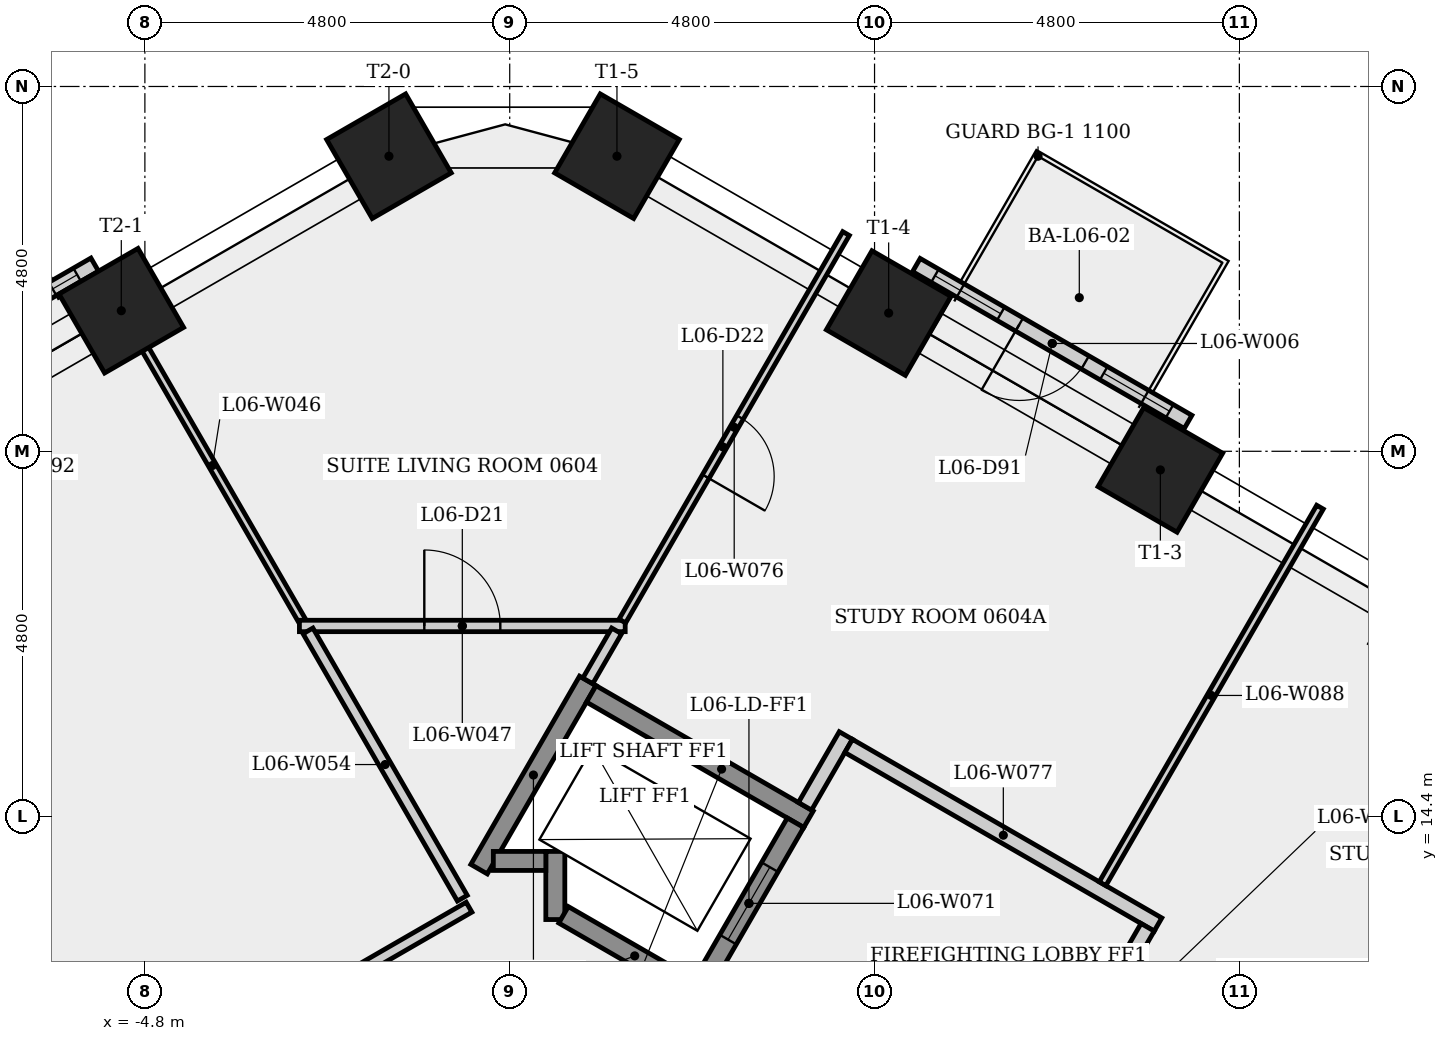
"""IFC4 building model, lengths in metres.
Left out: names, types, materials, properties, quantities, classifications, styles, units other than length and angle.
Written with IfcOpenShell. Run it as: python <this file> out.ifc"""

import sys

from ifc_helpers import new_model, si_unit, direction, frame, frame_2d, origin, origin_2d, place, context, subcontext, project, spatial, rectangle, extrude, element, fill, save


model = new_model("IFC4")
c1 = context("Model", 3, precision=1e-05, world=origin(), true_north=direction((0.0, 1.0)))
c2 = subcontext(c1, "Body", "Model", "MODEL_VIEW")
j1 = project(units=[si_unit("LENGTHUNIT", "METRE"), si_unit("PLANEANGLEUNIT", "RADIAN")], contexts=[c1])
p1 = place(None, origin())
s1 = spatial("IfcSite", under=j1, at=p1, CompositionType="ELEMENT")
p2 = place(p1, origin())
s2 = spatial("IfcBuilding", under=s1, at=p2, CompositionType="ELEMENT")
p3 = place(p2, frame((0.0, 0.0, 28.9)))
s3 = spatial("IfcBuildingStorey", under=s2, at=p3, CompositionType="ELEMENT", Elevation=28.9)
for number, where, z_axis, x_axis in (
    (1, (8.561, 18.955, 0.0), (0.0, 0.0, 1.0), (0.5, 0.866, 0.0)),
    (2, (4.986, 21.019, 0.0), (0.0, 0.0, 1.0), (0.5, 0.866, 0.0)),
    (3, (1.411, 23.083, 0.0), (0.0, 0.0, 1.0), (0.5, 0.866, 0.0)),
    (4, (-1.589, 23.083, 0.0), (0.0, 0.0, 1.0), (-0.5, 0.866, 0.0)),
    (5, (-5.11, 21.05, 0.0), (0.0, 0.0, 1.0), (-0.5, 0.866, 0.0)),
):
    element("IfcColumn", number, at=place(p3, frame(where, z_axis=z_axis, x_axis=x_axis)), inside=s3, PredefinedType="COLUMN", context=c2, shape_type="SweptSolid", body=[
        extrude(rectangle(XDim=1.2, YDim=1.2, at=origin_2d()), origin(), (0.0, 0.0, 1.0), 3.4),
    ])
p4 = place(p3, frame((-5.46, 21.656, 0.0), z_axis=(0.0, 0.0, 1.0), x_axis=(-0.866021634107, -0.500006529216, 0.0)))
e6 = element("IfcWall", 6, at=p4, inside=s3, PredefinedType="SOLIDWALL", context=c2, shape_type="SweptSolid", body=[
    extrude(rectangle(XDim=4.067, YDim=0.2, at=frame_2d((2.033, 0.0))), origin(), (0.0, 0.0, 1.0), 3.4),
])
p5 = place(p4, frame((1.533, 0.0, 0.0)))
e7 = element("IfcOpeningElement", 7, at=p5, cuts=e6, PredefinedType="OPENING", context=c2, shape_type="SweptSolid", body=[
    extrude(rectangle(XDim=1.0, YDim=2.4, at=frame_2d((0.5, 1.2))), frame((0.0, 0.11, 0.0), z_axis=(0.0, -1.0, 0.0), x_axis=(1.0, 0.0, 0.0)), (0.0, 0.0, 1.0), 0.22),
])
p6 = place(p4, frame((0.267, 0.0, 0.9)))
e8 = element("IfcOpeningElement", 8, at=p6, cuts=e6, PredefinedType="OPENING", context=c2, shape_type="SweptSolid", body=[
    extrude(rectangle(XDim=1.0, YDim=1.5, at=frame_2d((0.5, 0.75))), frame((0.0, 0.11, 0.0), z_axis=(0.0, -1.0, 0.0), x_axis=(1.0, 0.0, 0.0)), (0.0, 0.0, 1.0), 0.22),
])
p7 = place(p4, frame((2.8, 0.0, 0.9)))
e9 = element("IfcOpeningElement", 9, at=p7, cuts=e6, PredefinedType="OPENING", context=c2, shape_type="SweptSolid", body=[
    extrude(rectangle(XDim=1.0, YDim=1.5, at=frame_2d((0.5, 0.75))), frame((0.0, 0.11, 0.0), z_axis=(0.0, -1.0, 0.0), x_axis=(1.0, 0.0, 0.0)), (0.0, 0.0, 1.0), 0.22),
])
p8 = place(p3, frame((8.926, 19.587, 0.0), z_axis=(0.0, 0.0, 1.0), x_axis=(-0.866028988896, 0.499993790352, 0.0)))
e10 = element("IfcWall", 10, at=p8, inside=s3, PredefinedType="SOLIDWALL", context=c2, shape_type="SweptSolid", body=[
    extrude(rectangle(XDim=4.128, YDim=0.2, at=frame_2d((2.064, 0.0))), origin(), (0.0, 0.0, 1.0), 3.4),
])
p9 = place(p8, frame((1.564, 0.0, 0.0)))
e11 = element("IfcOpeningElement", 11, at=p9, cuts=e10, PredefinedType="OPENING", context=c2, shape_type="SweptSolid", body=[
    extrude(rectangle(XDim=1.0, YDim=2.4, at=frame_2d((0.5, 1.2))), frame((0.0, 0.11, 0.0), z_axis=(0.0, -1.0, 0.0), x_axis=(1.0, 0.0, 0.0)), (0.0, 0.0, 1.0), 0.22),
])
p10 = place(p8, frame((0.282, 0.0, 0.9)))
e12 = element("IfcOpeningElement", 12, at=p10, cuts=e10, PredefinedType="OPENING", context=c2, shape_type="SweptSolid", body=[
    extrude(rectangle(XDim=1.0, YDim=1.5, at=frame_2d((0.5, 0.75))), frame((0.0, 0.11, 0.0), z_axis=(0.0, -1.0, 0.0), x_axis=(1.0, 0.0, 0.0)), (0.0, 0.0, 1.0), 0.22),
])
p11 = place(p8, frame((2.846, 0.0, 0.9)))
e13 = element("IfcOpeningElement", 13, at=p11, cuts=e10, PredefinedType="OPENING", context=c2, shape_type="SweptSolid", body=[
    extrude(rectangle(XDim=1.0, YDim=1.5, at=frame_2d((0.5, 0.75))), frame((0.0, 0.11, 0.0), z_axis=(0.0, -1.0, 0.0), x_axis=(1.0, 0.0, 0.0)), (0.0, 0.0, 1.0), 0.22),
])
p12 = place(p3, frame((-10.825, 7.26, 0.0), z_axis=(0.0, 0.0, 1.0), x_axis=(0.866026819738, 0.499997547488, 0.0)))
e14 = element("IfcWall", 14, at=p12, inside=s3, PredefinedType="PARTITIONING", context=c2, shape_type="SweptSolid", body=[
    extrude(rectangle(XDim=11.882, YDim=0.15, at=frame_2d((5.941, 0.0))), origin(), (0.0, 0.0, 1.0), 3.05),
])
p13 = place(p12, frame((5.403, 0.0, 0.0)))
e15 = element("IfcOpeningElement", 15, at=p13, cuts=e14, PredefinedType="OPENING", context=c2, shape_type="SweptSolid", body=[
    extrude(rectangle(XDim=1.0, YDim=2.1, at=frame_2d((0.5, 1.05))), frame((0.0, 0.085, 0.0), z_axis=(0.0, -1.0, 0.0), x_axis=(1.0, 0.0, 0.0)), (0.0, 0.0, 1.0), 0.17),
])
p14 = place(p3, frame((-2.729, 16.967, 0.0), z_axis=(0.0, 0.0, 1.0), x_axis=(-0.500005632288, 0.866022151957, 0.0)))
e16 = element("IfcWall", 16, at=p14, inside=s3, PredefinedType="PARTITIONING", context=c2, shape_type="SweptSolid", body=[
    extrude(rectangle(XDim=4.727, YDim=0.1, at=frame_2d((2.363, 0.0))), origin(), (0.0, 0.0, 1.0), 3.05),
])
p15 = place(p3, frame((-2.767, 16.902, 0.0), z_axis=(0.0, 0.0, 1.0), x_axis=(1.0, 0.0, 0.0)))
e17 = element("IfcWall", 17, at=p15, inside=s3, PredefinedType="PARTITIONING", context=c2, shape_type="SweptSolid", body=[
    extrude(rectangle(XDim=4.286, YDim=0.15, at=frame_2d((2.143, 0.0))), origin(), (0.0, 0.0, 1.0), 3.05),
])
p16 = place(p15, frame((1.643, 0.0, 0.0)))
e18 = element("IfcOpeningElement", 18, at=p16, cuts=e17, PredefinedType="OPENING", context=c2, shape_type="SweptSolid", body=[
    extrude(rectangle(XDim=1.0, YDim=2.1, at=frame_2d((0.5, 1.05))), frame((0.0, 0.085, 0.0), z_axis=(0.0, -1.0, 0.0), x_axis=(1.0, 0.0, 0.0)), (0.0, 0.0, 1.0), 0.17),
])
p17 = place(p3, frame((-0.624, 13.32, 0.0), z_axis=(0.0, 0.0, 1.0), x_axis=(-0.499986114097, 0.866033420666, 0.0)))
e19 = element("IfcWall", 19, at=p17, inside=s3, PredefinedType="PARTITIONING", context=c2, shape_type="SweptSolid", body=[
    extrude(rectangle(XDim=4.061, YDim=0.15, at=frame_2d((2.031, 0.0))), origin(), (0.0, 0.0, 1.0), 3.05),
])
p18 = place(p3, frame((-0.403, 13.702, 0.0), z_axis=(0.0, 0.0, 1.0), x_axis=(0.499976111731, 0.866039195244, 0.0)))
e20 = element("IfcWall", 20, at=p18, inside=s3, PredefinedType="SHEAR", context=c2, shape_type="SweptSolid", body=[
    extrude(rectangle(XDim=2.861, YDim=0.25, at=frame_2d((1.43, 0.0))), origin(), (0.0, 0.0, 1.0), 3.05),
])
p19 = place(p3, frame((0.6, 13.039, 0.0), z_axis=(0.0, 0.0, 1.0), x_axis=(0.0, 1.0, 0.0)))
e21 = element("IfcWall", 21, at=p19, inside=s3, PredefinedType="SHEAR", context=c2, shape_type="SweptSolid", body=[
    extrude(rectangle(XDim=0.896, YDim=0.25, at=frame_2d((0.448, 0.0))), origin(), (0.0, 0.0, 1.0), 3.05),
])
p20 = place(p3, frame((0.475, 13.81, 0.0), z_axis=(0.0, 0.0, 1.0), x_axis=(-1.0, 0.0, 0.0)))
e22 = element("IfcWall", 22, at=p20, inside=s3, PredefinedType="SHEAR", context=c2, shape_type="SweptSolid", body=[
    extrude(rectangle(XDim=0.691, YDim=0.25, at=frame_2d((0.345, 0.0))), origin(), (0.0, 0.0, 1.0), 3.4),
])
p21 = place(p3, frame((1.073, 16.008, 0.0), z_axis=(0.0, 0.0, 1.0), x_axis=(0.866040211805, -0.499974350878, 0.0)))
e23 = element("IfcWall", 23, at=p21, inside=s3, PredefinedType="SHEAR", context=c2, shape_type="SweptSolid", body=[
    extrude(rectangle(XDim=3.3, YDim=0.25, at=frame_2d((1.65, 0.0))), origin(), (0.0, 0.0, 1.0), 3.05),
])
p22 = place(p3, frame((1.407, 16.837, 0.0), z_axis=(0.0, 0.0, 1.0), x_axis=(-0.499907982315, -0.866078523702, 0.0)))
e24 = element("IfcWall", 24, at=p22, inside=s3, PredefinedType="PARTITIONING", context=c2, shape_type="SweptSolid", body=[
    extrude(rectangle(XDim=0.76, YDim=0.15, at=frame_2d((0.38, 0.0))), origin(), (0.0, 0.0, 1.0), 3.05),
])
p23 = place(p3, frame((2.581, 12.02, 0.0), z_axis=(0.0, 0.0, 1.0), x_axis=(-0.86603892542, 0.499976579108, 0.0)))
e25 = element("IfcWall", 25, at=p23, inside=s3, PredefinedType="SHEAR", context=c2, shape_type="SweptSolid", body=[
    extrude(rectangle(XDim=2.162, YDim=0.25, at=frame_2d((1.081, 0.0))), origin(), (0.0, 0.0, 1.0), 3.05),
])
p24 = place(p3, frame((2.535, 12.191, 0.0), z_axis=(0.0, 0.0, 1.0), x_axis=(0.500061746146, 0.865989751695, 0.0)))
e26 = element("IfcWall", 26, at=p24, inside=s3, PredefinedType="SHEAR", context=c2, shape_type="SweptSolid", body=[
    extrude(rectangle(XDim=2.45, YDim=0.25, at=frame_2d((1.225, 0.0))), origin(), (0.0, 0.0, 1.0), 3.4),
])
p25 = place(p24, frame((0.675, 0.0, 0.0)))
e27 = element("IfcOpeningElement", 27, at=p25, cuts=e26, PredefinedType="OPENING", context=c2, shape_type="SweptSolid", body=[
    extrude(rectangle(XDim=1.1, YDim=2.1, at=frame_2d((0.55, 1.05))), frame((0.0, 0.135, 0.0), z_axis=(0.0, -1.0, 0.0), x_axis=(1.0, 0.0, 0.0)), (0.0, 0.0, 1.0), 0.27),
])
p26 = place(p3, frame((3.885, 14.529, 0.0), z_axis=(0.0, 0.0, 1.0), x_axis=(0.499997628298, 0.866026773083, 0.0)))
e28 = element("IfcWall", 28, at=p26, inside=s3, PredefinedType="PARTITIONING", context=c2, shape_type="SweptSolid", body=[
    extrude(rectangle(XDim=1.075, YDim=0.2, at=frame_2d((0.538, 0.0))), origin(), (0.0, 0.0, 1.0), 3.05),
])
p27 = place(p3, frame((4.425, 22.065, 0.0), z_axis=(0.0, 0.0, 1.0), x_axis=(-0.500024001918, -0.866011545827, 0.0)))
e29 = element("IfcWall", 29, at=p27, inside=s3, PredefinedType="PARTITIONING", context=c2, shape_type="SweptSolid", body=[
    extrude(rectangle(XDim=5.887, YDim=0.1, at=frame_2d((2.943, 0.0))), origin(), (0.0, 0.0, 1.0), 3.05),
])
p28 = place(p27, frame((2.792, 0.0, 0.0)))
e30 = element("IfcOpeningElement", 30, at=p28, cuts=e29, PredefinedType="OPENING", context=c2, shape_type="SweptSolid", body=[
    extrude(rectangle(XDim=0.9, YDim=2.1, at=frame_2d((0.45, 1.05))), frame((0.0, 0.06, 0.0), z_axis=(0.0, -1.0, 0.0), x_axis=(1.0, 0.0, 0.0)), (0.0, 0.0, 1.0), 0.12),
])
p29 = place(p3, frame((4.459, 15.323, 0.0), z_axis=(0.0, 0.0, 1.0), x_axis=(0.866016039709, -0.500016218704, 0.0)))
e31 = element("IfcWall", 31, at=p29, inside=s3, PredefinedType="PARTITIONING", context=c2, shape_type="SweptSolid", body=[
    extrude(rectangle(XDim=4.7, YDim=0.2, at=frame_2d((2.35, 0.0))), origin(), (0.0, 0.0, 1.0), 3.05),
])
p30 = place(p3, frame((6.48, 9.624, 0.0), z_axis=(0.0, 0.0, 1.0), x_axis=(0.500017246033, 0.866015446554, 0.0)))
e32 = element("IfcWall", 32, at=p30, inside=s3, PredefinedType="SHEAR", context=c2, shape_type="SweptSolid", body=[
    extrude(rectangle(XDim=3.25, YDim=0.25, at=frame_2d((1.625, 0.0))), origin(), (0.0, 0.0, 1.0), 3.05),
])
p31 = place(p30, frame((1.125, 0.0, 0.0)))
e33 = element("IfcOpeningElement", 33, at=p31, cuts=e32, PredefinedType="OPENING", context=c2, shape_type="SweptSolid", body=[
    extrude(rectangle(XDim=1.0, YDim=2.1, at=frame_2d((0.5, 1.05))), frame((0.0, 0.135, 0.0), z_axis=(0.0, -1.0, 0.0), x_axis=(1.0, 0.0, 0.0)), (0.0, 0.0, 1.0), 0.27),
])
p32 = place(p3, frame((7.8, 13.51, 0.0), z_axis=(0.0, 0.0, 1.0), x_axis=(0.499989639809, 0.866031385161, 0.0)))
e34 = element("IfcWall", 34, at=p32, inside=s3, PredefinedType="PARTITIONING", context=c2, shape_type="SweptSolid", body=[
    extrude(rectangle(XDim=5.721, YDim=0.1, at=frame_2d((2.861, 0.0))), origin(), (0.0, 0.0, 1.0), 3.05),
])
p33 = place(p3, frame((8.393, 12.937, 0.0), z_axis=(0.0, 0.0, 1.0), x_axis=(-0.500065409566, -0.86598763626, 0.0)))
e35 = element("IfcWall", 35, at=p33, inside=s3, PredefinedType="PARTITIONING", context=c2, shape_type="SweptSolid", body=[
    extrude(rectangle(XDim=0.575, YDim=0.2, at=frame_2d((0.288, 0.0))), origin(), (0.0, 0.0, 1.0), 3.05),
])
p34 = place(p6, origin())
e36 = element("IfcWindow", 36, at=p34, inside=s3, PartitioningType="SINGLE_PANEL", PredefinedType="WINDOW", context=c2, shape_type="SweptSolid", body=[
    extrude(rectangle(XDim=1.0, YDim=1.5, at=frame_2d((0.5, 0.75))), frame((0.0, 0.03, 0.0), z_axis=(0.0, -1.0, 0.0), x_axis=(1.0, 0.0, 0.0)), (0.0, 0.0, 1.0), 0.06),
])
fill(e8, e36)
p35 = place(p9, origin())
e37 = element("IfcDoor", 37, at=p35, inside=s3, OperationType="SINGLE_SWING_RIGHT", PredefinedType="DOOR", context=c2, shape_type="SweptSolid", body=[
    extrude(rectangle(XDim=1.0, YDim=2.4, at=frame_2d((0.5, 1.2))), frame((0.0, 0.025, 0.0), z_axis=(0.0, -1.0, 0.0), x_axis=(1.0, 0.0, 0.0)), (0.0, 0.0, 1.0), 0.05),
])
fill(e11, e37)
p36 = place(p10, origin())
e38 = element("IfcWindow", 38, at=p36, inside=s3, PartitioningType="SINGLE_PANEL", PredefinedType="WINDOW", context=c2, shape_type="SweptSolid", body=[
    extrude(rectangle(XDim=1.0, YDim=1.5, at=frame_2d((0.5, 0.75))), frame((0.0, 0.03, 0.0), z_axis=(0.0, -1.0, 0.0), x_axis=(1.0, 0.0, 0.0)), (0.0, 0.0, 1.0), 0.06),
])
fill(e12, e38)
p37 = place(p11, origin())
e39 = element("IfcWindow", 39, at=p37, inside=s3, PartitioningType="SINGLE_PANEL", PredefinedType="WINDOW", context=c2, shape_type="SweptSolid", body=[
    extrude(rectangle(XDim=1.0, YDim=1.5, at=frame_2d((0.5, 0.75))), frame((0.0, 0.03, 0.0), z_axis=(0.0, -1.0, 0.0), x_axis=(1.0, 0.0, 0.0)), (0.0, 0.0, 1.0), 0.06),
])
fill(e13, e39)
p38 = place(p25, origin())
e40 = element("IfcDoor", 40, at=p38, inside=s3, OperationType="SLIDING_TO_LEFT", PredefinedType="DOOR", context=c2, shape_type="SweptSolid", body=[
    extrude(rectangle(XDim=1.1, YDim=2.1, at=frame_2d((0.55, 1.05))), frame((0.0, 0.025, 0.0), z_axis=(0.0, -1.0, 0.0), x_axis=(1.0, 0.0, 0.0)), (0.0, 0.0, 1.0), 0.05),
])
fill(e27, e40)
p39 = place(p16, origin())
e41 = element("IfcDoor", 41, at=p39, inside=s3, OperationType="SINGLE_SWING_LEFT", PredefinedType="DOOR", context=c2, shape_type="SweptSolid", body=[
    extrude(rectangle(XDim=1.0, YDim=2.1, at=frame_2d((0.5, 1.05))), frame((0.0, 0.025, 0.0), z_axis=(0.0, -1.0, 0.0), x_axis=(1.0, 0.0, 0.0)), (0.0, 0.0, 1.0), 0.05),
])
fill(e18, e41)
p40 = place(p28, origin())
e42 = element("IfcDoor", 42, at=p40, inside=s3, OperationType="SINGLE_SWING_RIGHT", PredefinedType="DOOR", context=c2, shape_type="SweptSolid", body=[
    extrude(rectangle(XDim=0.9, YDim=2.1, at=frame_2d((0.45, 1.05))), frame((0.0, 0.025, 0.0), z_axis=(0.0, -1.0, 0.0), x_axis=(1.0, 0.0, 0.0)), (0.0, 0.0, 1.0), 0.05),
])
fill(e30, e42)
save(model, sys.argv[1])
